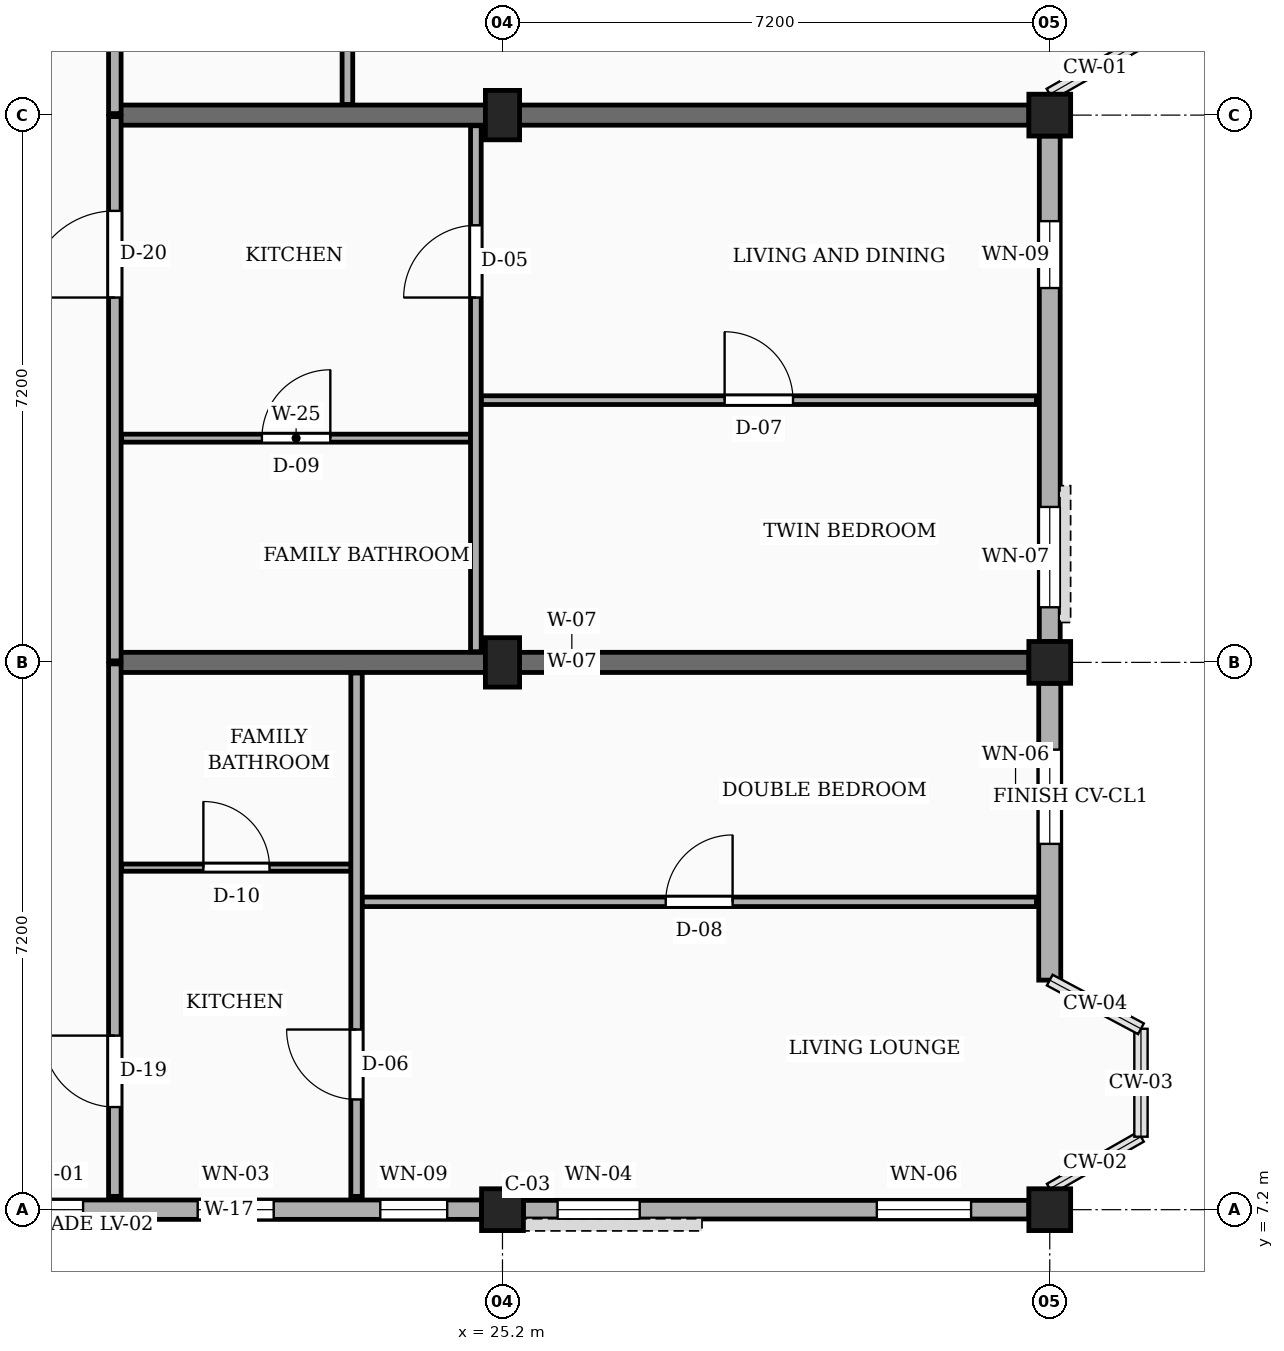
"""IFC4 building model, lengths in metres.
Left out: names, types, materials, properties, quantities, classifications, styles, units other than length and angle.
Written with IfcOpenShell. Run it as: python <this file> out.ifc"""

import sys

from ifc_helpers import new_model, si_unit, direction, frame, frame_2d, origin, origin_2d, place, context, subcontext, project, spatial, rectangle, extrude, element, fill, save


model = new_model("IFC4")
c1 = context("Model", 3, precision=1e-05, world=origin(), true_north=direction((0.0, 1.0)))
c2 = subcontext(c1, "Body", "Model", "MODEL_VIEW")
j1 = project(units=[si_unit("LENGTHUNIT", "METRE"), si_unit("PLANEANGLEUNIT", "RADIAN")], contexts=[c1])
p1 = place(None, origin())
s1 = spatial("IfcSite", under=j1, at=p1, CompositionType="ELEMENT")
p2 = place(p1, origin())
s2 = spatial("IfcBuilding", under=s1, at=p2, CompositionType="ELEMENT")
p3 = place(p2, frame((0.0, 0.0, 10.8)))
s3 = spatial("IfcBuildingStorey", under=s2, at=p3, CompositionType="ELEMENT", Elevation=10.8)
p4 = place(p3, frame((25.2, 7.2, 0.0), z_axis=(0.0, 0.0, 1.0), x_axis=(1.0, 0.0, 0.0)))
e1 = element("IfcColumn", 1, at=p4, inside=s3, PredefinedType="COLUMN", context=c2, shape_type="SweptSolid", body=[
    extrude(rectangle(XDim=0.55, YDim=0.55, at=origin_2d()), origin(), (0.0, 0.0, 1.0), 3.15),
])
for number, where, z_axis, x_axis in (
    (2, (25.2, 14.4, 0.0), (0.0, 0.0, 1.0), (1.0, 0.0, 0.0)),
    (3, (25.2, 21.6, 0.0), (0.0, 0.0, 1.0), (1.0, 0.0, 0.0)),
):
    element("IfcColumn", number, at=place(p3, frame(where, z_axis=z_axis, x_axis=x_axis)), inside=s3, PredefinedType="COLUMN", context=c2, shape_type="SweptSolid", body=[
        extrude(rectangle(XDim=0.45, YDim=0.65, at=origin_2d()), origin(), (0.0, 0.0, 1.0), 3.15),
    ])
for number, where, z_axis, x_axis in (
    (4, (32.4, 7.2, 0.0), (0.0, 0.0, 1.0), (1.0, 0.0, 0.0)),
    (5, (32.4, 14.4, 0.0), (0.0, 0.0, 1.0), (1.0, 0.0, 0.0)),
    (6, (32.4, 21.6, 0.0), (0.0, 0.0, 1.0), (1.0, 0.0, 0.0)),
):
    element("IfcColumn", number, at=place(p3, frame(where, z_axis=z_axis, x_axis=x_axis)), inside=s3, PredefinedType="COLUMN", context=c2, shape_type="SweptSolid", body=[
        extrude(rectangle(XDim=0.55, YDim=0.55, at=origin_2d()), origin(), (0.0, 0.0, 1.0), 3.15),
    ])
for number, where, z_axis, x_axis in (
    (7, (20.1, 14.4, 0.0), (0.0, 0.0, 1.0), (1.0, 0.0, 0.0)),
    (8, (20.1, 21.6, 0.0), (0.0, 0.0, 1.0), (1.0, 0.0, 0.0)),
):
    element("IfcWall", number, at=place(p3, frame(where, z_axis=z_axis, x_axis=x_axis)), inside=s3, PredefinedType="SOLIDWALL", context=c2, shape_type="SweptSolid", body=[
        extrude(rectangle(XDim=12.025, YDim=0.265, at=frame_2d((6.012, 0.0))), origin(), (0.0, 0.0, 1.0), 2.17),
    ])
p5 = place(p3, frame((18.275, 7.2, 0.0), z_axis=(0.0, 0.0, 1.0), x_axis=(1.0, 0.0, 0.0)))
e9 = element("IfcWall", 9, at=p5, inside=s3, PredefinedType="SOLIDWALL", context=c2, shape_type="SweptSolid", body=[
    extrude(rectangle(XDim=6.65, YDim=0.255, at=frame_2d((3.325, 0.0))), origin(), (0.0, 0.0, 1.0), 2.44),
])
p6 = place(p5, frame((0.558, 0.0, 0.78)))
e10 = element("IfcOpeningElement", 10, at=p6, cuts=e9, PredefinedType="OPENING", context=c2, shape_type="SweptSolid", body=[
    extrude(rectangle(XDim=0.85, YDim=1.15, at=frame_2d((0.425, 0.575))), frame((0.0, 0.137, 0.0), z_axis=(0.0, -1.0, 0.0), x_axis=(1.0, 0.0, 0.0)), (0.0, 0.0, 1.0), 0.275),
])
p7 = place(p5, frame((2.915, 0.0, 0.78)))
e11 = element("IfcOpeningElement", 11, at=p7, cuts=e9, PredefinedType="OPENING", context=c2, shape_type="SweptSolid", body=[
    extrude(rectangle(XDim=1.0, YDim=1.15, at=frame_2d((0.5, 0.575))), frame((0.0, 0.137, 0.0), z_axis=(0.0, -1.0, 0.0), x_axis=(1.0, 0.0, 0.0)), (0.0, 0.0, 1.0), 0.275),
])
p8 = place(p5, frame((5.317, 0.0, 0.78)))
e12 = element("IfcOpeningElement", 12, at=p8, cuts=e9, PredefinedType="OPENING", context=c2, shape_type="SweptSolid", body=[
    extrude(rectangle(XDim=0.88, YDim=1.26, at=frame_2d((0.44, 0.63))), frame((0.0, 0.137, 0.0), z_axis=(0.0, -1.0, 0.0), x_axis=(1.0, 0.0, 0.0)), (0.0, 0.0, 1.0), 0.275),
])
p9 = place(p3, frame((25.475, 7.2, 0.0), z_axis=(0.0, 0.0, 1.0), x_axis=(1.0, 0.0, 0.0)))
e13 = element("IfcWall", 13, at=p9, inside=s3, PredefinedType="SOLIDWALL", context=c2, shape_type="SweptSolid", body=[
    extrude(rectangle(XDim=6.65, YDim=0.245, at=frame_2d((3.325, 0.0))), origin(), (0.0, 0.0, 1.0), 2.44),
])
p10 = place(p9, frame((0.45, 0.0, 0.78)))
e14 = element("IfcOpeningElement", 14, at=p10, cuts=e13, PredefinedType="OPENING", context=c2, shape_type="SweptSolid", body=[
    extrude(rectangle(XDim=1.08, YDim=1.15, at=frame_2d((0.54, 0.575))), frame((0.0, 0.133, 0.0), z_axis=(0.0, -1.0, 0.0), x_axis=(1.0, 0.0, 0.0)), (0.0, 0.0, 1.0), 0.265),
])
p11 = place(p9, frame((4.65, 0.0, 0.78)))
e15 = element("IfcOpeningElement", 15, at=p11, cuts=e13, PredefinedType="OPENING", context=c2, shape_type="SweptSolid", body=[
    extrude(rectangle(XDim=1.24, YDim=1.15, at=frame_2d((0.62, 0.575))), frame((0.0, 0.133, 0.0), z_axis=(0.0, -1.0, 0.0), x_axis=(1.0, 0.0, 0.0)), (0.0, 0.0, 1.0), 0.265),
])
p12 = place(p3, frame((32.4, 10.22, 0.0), z_axis=(0.0, 0.0, 1.0), x_axis=(0.0, 1.0, 0.0)))
e16 = element("IfcWall", 16, at=p12, inside=s3, PredefinedType="SOLIDWALL", context=c2, shape_type="SweptSolid", body=[
    extrude(rectangle(XDim=3.905, YDim=0.29, at=frame_2d((1.953, 0.0))), origin(), (0.0, 0.0, 1.0), 2.44),
])
p13 = place(p12, frame((1.792, 0.0, 0.78)))
e17 = element("IfcOpeningElement", 17, at=p13, cuts=e16, PredefinedType="OPENING", context=c2, shape_type="SweptSolid", body=[
    extrude(rectangle(XDim=1.24, YDim=1.15, at=frame_2d((0.62, 0.575))), frame((0.0, 0.155, 0.0), z_axis=(0.0, -1.0, 0.0), x_axis=(1.0, 0.0, 0.0)), (0.0, 0.0, 1.0), 0.31),
])
p14 = place(p3, frame((32.4, 14.675, 0.0), z_axis=(0.0, 0.0, 1.0), x_axis=(0.0, 1.0, 0.0)))
e18 = element("IfcWall", 18, at=p14, inside=s3, PredefinedType="SOLIDWALL", context=c2, shape_type="SweptSolid", body=[
    extrude(rectangle(XDim=6.65, YDim=0.275, at=frame_2d((3.325, 0.0))), origin(), (0.0, 0.0, 1.0), 2.44),
])
p15 = place(p14, frame((0.45, 0.0, 0.78)))
e19 = element("IfcOpeningElement", 19, at=p15, cuts=e18, PredefinedType="OPENING", context=c2, shape_type="SweptSolid", body=[
    extrude(rectangle(XDim=1.32, YDim=1.15, at=frame_2d((0.66, 0.575))), frame((0.0, 0.147, 0.0), z_axis=(0.0, -1.0, 0.0), x_axis=(1.0, 0.0, 0.0)), (0.0, 0.0, 1.0), 0.295),
])
p16 = place(p14, frame((4.65, 0.0, 0.78)))
e20 = element("IfcOpeningElement", 20, at=p16, cuts=e18, PredefinedType="OPENING", context=c2, shape_type="SweptSolid", body=[
    extrude(rectangle(XDim=0.88, YDim=1.26, at=frame_2d((0.44, 0.63))), frame((0.0, 0.147, 0.0), z_axis=(0.0, -1.0, 0.0), x_axis=(1.0, 0.0, 0.0)), (0.0, 0.0, 1.0), 0.295),
])
p17 = place(p3, frame((20.1, 7.375, 0.0), z_axis=(0.0, 0.0, 1.0), x_axis=(0.0, 1.0, 0.0)))
e21 = element("IfcWall", 21, at=p17, inside=s3, PredefinedType="PARTITIONING", context=c2, shape_type="SweptSolid", body=[
    extrude(rectangle(XDim=7.005, YDim=0.165, at=frame_2d((3.502, 0.0))), origin(), (0.0, 0.0, 1.0), 2.305),
])
p18 = place(p17, frame((1.175, 0.0, 0.0)))
e22 = element("IfcOpeningElement", 22, at=p18, cuts=e21, PredefinedType="OPENING", context=c2, shape_type="SweptSolid", body=[
    extrude(rectangle(XDim=0.94, YDim=2.12, at=frame_2d((0.47, 1.06))), frame((0.0, 0.093, 0.0), z_axis=(0.0, -1.0, 0.0), x_axis=(1.0, 0.0, 0.0)), (0.0, 0.0, 1.0), 0.185),
])
p19 = place(p3, frame((20.1, 14.42, 0.0), z_axis=(0.0, 0.0, 1.0), x_axis=(0.0, 1.0, 0.0)))
e23 = element("IfcWall", 23, at=p19, inside=s3, PredefinedType="PARTITIONING", context=c2, shape_type="SweptSolid", body=[
    extrude(rectangle(XDim=7.16, YDim=0.165, at=frame_2d((3.58, 0.0))), origin(), (0.0, 0.0, 1.0), 2.305),
])
p20 = place(p19, frame((4.78, 0.0, 0.0)))
e24 = element("IfcOpeningElement", 24, at=p20, cuts=e23, PredefinedType="OPENING", context=c2, shape_type="SweptSolid", body=[
    extrude(rectangle(XDim=1.14, YDim=2.18, at=frame_2d((0.57, 1.09))), frame((0.0, 0.093, 0.0), z_axis=(0.0, -1.0, 0.0), x_axis=(1.0, 0.0, 0.0)), (0.0, 0.0, 1.0), 0.185),
])
p21 = place(p3, frame((20.1, 21.62, 0.0), z_axis=(0.0, 0.0, 1.0), x_axis=(0.0, 1.0, 0.0)))
e25 = element("IfcWall", 25, at=p21, inside=s3, PredefinedType="PARTITIONING", context=c2, shape_type="SweptSolid", body=[
    extrude(rectangle(XDim=7.16, YDim=0.165, at=frame_2d((3.58, 0.0))), origin(), (0.0, 0.0, 1.0), 2.305),
])
p22 = place(p21, frame((1.33, 0.0, 0.0)))
e26 = element("IfcOpeningElement", 26, at=p22, cuts=e25, PredefinedType="OPENING", context=c2, shape_type="SweptSolid", body=[
    extrude(rectangle(XDim=1.0, YDim=2.15, at=frame_2d((0.5, 1.075))), frame((0.0, 0.093, 0.0), z_axis=(0.0, -1.0, 0.0), x_axis=(1.0, 0.0, 0.0)), (0.0, 0.0, 1.0), 0.185),
])
p23 = place(p3, frame((23.35, 11.25, 0.0), z_axis=(0.0, 0.0, 1.0), x_axis=(1.0, 0.0, 0.0)))
e27 = element("IfcWall", 27, at=p23, inside=s3, PredefinedType="PARTITIONING", context=c2, shape_type="SweptSolid", body=[
    extrude(rectangle(XDim=8.875, YDim=0.125, at=frame_2d((4.438, 0.0))), origin(), (0.0, 0.0, 1.0), 2.305),
])
p24 = place(p23, frame((3.998, 0.0, 0.0)))
e28 = element("IfcOpeningElement", 28, at=p24, cuts=e27, PredefinedType="OPENING", context=c2, shape_type="SweptSolid", body=[
    extrude(rectangle(XDim=0.88, YDim=2.08, at=frame_2d((0.44, 1.04))), frame((0.0, 0.073, 0.0), z_axis=(0.0, -1.0, 0.0), x_axis=(1.0, 0.0, 0.0)), (0.0, 0.0, 1.0), 0.145),
])
p25 = place(p3, frame((20.19, 11.7, 0.0), z_axis=(0.0, 0.0, 1.0), x_axis=(1.0, 0.0, 0.0)))
e29 = element("IfcWall", 29, at=p25, inside=s3, PredefinedType="PARTITIONING", context=c2, shape_type="SweptSolid", body=[
    extrude(rectangle(XDim=3.02, YDim=0.095, at=frame_2d((1.51, 0.0))), origin(), (0.0, 0.0, 1.0), 2.305),
])
p26 = place(p25, frame((1.075, 0.0, 0.0)))
e30 = element("IfcOpeningElement", 30, at=p26, cuts=e29, PredefinedType="OPENING", context=c2, shape_type="SweptSolid", body=[
    extrude(rectangle(XDim=0.87, YDim=2.05, at=frame_2d((0.435, 1.025))), frame((0.0, 0.058, 0.0), z_axis=(0.0, -1.0, 0.0), x_axis=(1.0, 0.0, 0.0)), (0.0, 0.0, 1.0), 0.115),
])
p27 = place(p3, frame((23.28, 7.375, 0.0), z_axis=(0.0, 0.0, 1.0), x_axis=(0.0, 1.0, 0.0)))
e31 = element("IfcWall", 31, at=p27, inside=s3, PredefinedType="PARTITIONING", context=c2, shape_type="SweptSolid", body=[
    extrude(rectangle(XDim=6.885, YDim=0.15, at=frame_2d((3.442, 0.0))), origin(), (0.0, 0.0, 1.0), 2.305),
])
p28 = place(p27, frame((1.275, 0.0, 0.0)))
e32 = element("IfcOpeningElement", 32, at=p28, cuts=e31, PredefinedType="OPENING", context=c2, shape_type="SweptSolid", body=[
    extrude(rectangle(XDim=0.92, YDim=2.1, at=frame_2d((0.46, 1.05))), frame((0.0, 0.085, 0.0), z_axis=(0.0, -1.0, 0.0), x_axis=(1.0, 0.0, 0.0)), (0.0, 0.0, 1.0), 0.17),
])
p29 = place(p3, frame((24.92, 17.85, 0.0), z_axis=(0.0, 0.0, 1.0), x_axis=(1.0, 0.0, 0.0)))
e33 = element("IfcWall", 33, at=p29, inside=s3, PredefinedType="PARTITIONING", context=c2, shape_type="SweptSolid", body=[
    extrude(rectangle(XDim=7.305, YDim=0.115, at=frame_2d((3.653, 0.0))), origin(), (0.0, 0.0, 1.0), 2.305),
])
p30 = place(p29, frame((3.202, 0.0, 0.0)))
e34 = element("IfcOpeningElement", 34, at=p30, cuts=e33, PredefinedType="OPENING", context=c2, shape_type="SweptSolid", body=[
    extrude(rectangle(XDim=0.9, YDim=2.1, at=frame_2d((0.45, 1.05))), frame((0.0, 0.067, 0.0), z_axis=(0.0, -1.0, 0.0), x_axis=(1.0, 0.0, 0.0)), (0.0, 0.0, 1.0), 0.135),
])
p31 = place(p3, frame((20.19, 17.35, 0.0), z_axis=(0.0, 0.0, 1.0), x_axis=(1.0, 0.0, 0.0)))
e35 = element("IfcWall", 35, at=p31, inside=s3, PredefinedType="PARTITIONING", context=c2, shape_type="SweptSolid", body=[
    extrude(rectangle(XDim=4.59, YDim=0.105, at=frame_2d((2.295, 0.0))), origin(), (0.0, 0.0, 1.0), 2.305),
])
p32 = place(p31, frame((1.845, 0.0, 0.0)))
e36 = element("IfcOpeningElement", 36, at=p32, cuts=e35, PredefinedType="OPENING", context=c2, shape_type="SweptSolid", body=[
    extrude(rectangle(XDim=0.9, YDim=2.05, at=frame_2d((0.45, 1.025))), frame((0.0, 0.062, 0.0), z_axis=(0.0, -1.0, 0.0), x_axis=(1.0, 0.0, 0.0)), (0.0, 0.0, 1.0), 0.125),
])
p33 = place(p3, frame((24.85, 14.54, 0.0), z_axis=(0.0, 0.0, 1.0), x_axis=(0.0, 1.0, 0.0)))
e37 = element("IfcWall", 37, at=p33, inside=s3, PredefinedType="PARTITIONING", context=c2, shape_type="SweptSolid", body=[
    extrude(rectangle(XDim=6.92, YDim=0.14, at=frame_2d((3.46, 0.0))), origin(), (0.0, 0.0, 1.0), 2.305),
])
p34 = place(p33, frame((4.66, 0.0, 0.0)))
e38 = element("IfcOpeningElement", 38, at=p34, cuts=e37, PredefinedType="OPENING", context=c2, shape_type="SweptSolid", body=[
    extrude(rectangle(XDim=0.95, YDim=2.1, at=frame_2d((0.475, 1.05))), frame((0.0, 0.08, 0.0), z_axis=(0.0, -1.0, 0.0), x_axis=(1.0, 0.0, 0.0)), (0.0, 0.0, 1.0), 0.16),
])
p35 = place(p3, frame((23.16, 21.74, 0.0), z_axis=(0.0, 0.0, 1.0), x_axis=(0.0, 1.0, 0.0)))
e39 = element("IfcWall", 39, at=p35, inside=s3, PredefinedType="PARTITIONING", context=c2, shape_type="SweptSolid", body=[
    extrude(rectangle(XDim=6.92, YDim=0.14, at=frame_2d((3.46, 0.0))), origin(), (0.0, 0.0, 1.0), 2.305),
])
p36 = place(p35, frame((1.31, 0.0, 0.0)))
e40 = element("IfcOpeningElement", 40, at=p36, cuts=e39, PredefinedType="OPENING", context=c2, shape_type="SweptSolid", body=[
    extrude(rectangle(XDim=0.92, YDim=2.1, at=frame_2d((0.46, 1.05))), frame((0.0, 0.08, 0.0), z_axis=(0.0, -1.0, 0.0), x_axis=(1.0, 0.0, 0.0)), (0.0, 0.0, 1.0), 0.16),
])
p37 = place(p6, origin())
e41 = element("IfcWindow", 41, at=p37, inside=s3, PartitioningType="SINGLE_PANEL", PredefinedType="WINDOW", context=c2, shape_type="SweptSolid", body=[
    extrude(rectangle(XDim=0.85, YDim=1.15, at=frame_2d((0.425, 0.575))), frame((0.0, 0.03, 0.0), z_axis=(0.0, -1.0, 0.0), x_axis=(1.0, 0.0, 0.0)), (0.0, 0.0, 1.0), 0.06),
])
fill(e10, e41)
p38 = place(p7, origin())
e42 = element("IfcWindow", 42, at=p38, inside=s3, PartitioningType="SINGLE_PANEL", PredefinedType="WINDOW", context=c2, shape_type="SweptSolid", body=[
    extrude(rectangle(XDim=1.0, YDim=1.15, at=frame_2d((0.5, 0.575))), frame((0.0, 0.03, 0.0), z_axis=(0.0, -1.0, 0.0), x_axis=(1.0, 0.0, 0.0)), (0.0, 0.0, 1.0), 0.06),
])
fill(e11, e42)
p39 = place(p8, origin())
e43 = element("IfcWindow", 43, at=p39, inside=s3, PartitioningType="SINGLE_PANEL", PredefinedType="WINDOW", context=c2, shape_type="SweptSolid", body=[
    extrude(rectangle(XDim=0.88, YDim=1.26, at=frame_2d((0.44, 0.63))), frame((0.0, 0.03, 0.0), z_axis=(0.0, -1.0, 0.0), x_axis=(1.0, 0.0, 0.0)), (0.0, 0.0, 1.0), 0.06),
])
fill(e12, e43)
p40 = place(p10, origin())
e44 = element("IfcWindow", 44, at=p40, inside=s3, PartitioningType="SINGLE_PANEL", PredefinedType="WINDOW", context=c2, shape_type="SweptSolid", body=[
    extrude(rectangle(XDim=1.08, YDim=1.15, at=frame_2d((0.54, 0.575))), frame((0.0, 0.03, 0.0), z_axis=(0.0, -1.0, 0.0), x_axis=(1.0, 0.0, 0.0)), (0.0, 0.0, 1.0), 0.06),
])
fill(e14, e44)
p41 = place(p11, origin())
e45 = element("IfcWindow", 45, at=p41, inside=s3, PartitioningType="SINGLE_PANEL", PredefinedType="WINDOW", context=c2, shape_type="SweptSolid", body=[
    extrude(rectangle(XDim=1.24, YDim=1.15, at=frame_2d((0.62, 0.575))), frame((0.0, 0.03, 0.0), z_axis=(0.0, -1.0, 0.0), x_axis=(1.0, 0.0, 0.0)), (0.0, 0.0, 1.0), 0.06),
])
fill(e15, e45)
p42 = place(p13, origin())
e46 = element("IfcWindow", 46, at=p42, inside=s3, PartitioningType="SINGLE_PANEL", PredefinedType="WINDOW", context=c2, shape_type="SweptSolid", body=[
    extrude(rectangle(XDim=1.24, YDim=1.15, at=frame_2d((0.62, 0.575))), frame((0.0, 0.03, 0.0), z_axis=(0.0, -1.0, 0.0), x_axis=(1.0, 0.0, 0.0)), (0.0, 0.0, 1.0), 0.06),
])
fill(e17, e46)
p43 = place(p15, origin())
e47 = element("IfcWindow", 47, at=p43, inside=s3, PartitioningType="SINGLE_PANEL", PredefinedType="WINDOW", context=c2, shape_type="SweptSolid", body=[
    extrude(rectangle(XDim=1.32, YDim=1.15, at=frame_2d((0.66, 0.575))), frame((0.0, 0.03, 0.0), z_axis=(0.0, -1.0, 0.0), x_axis=(1.0, 0.0, 0.0)), (0.0, 0.0, 1.0), 0.06),
])
fill(e19, e47)
p44 = place(p16, origin())
e48 = element("IfcWindow", 48, at=p44, inside=s3, PartitioningType="SINGLE_PANEL", PredefinedType="WINDOW", context=c2, shape_type="SweptSolid", body=[
    extrude(rectangle(XDim=0.88, YDim=1.26, at=frame_2d((0.44, 0.63))), frame((0.0, 0.03, 0.0), z_axis=(0.0, -1.0, 0.0), x_axis=(1.0, 0.0, 0.0)), (0.0, 0.0, 1.0), 0.06),
])
fill(e20, e48)
p45 = place(p18, origin())
e49 = element("IfcDoor", 49, at=p45, inside=s3, OperationType="SINGLE_SWING_RIGHT", PredefinedType="DOOR", context=c2, shape_type="SweptSolid", body=[
    extrude(rectangle(XDim=0.94, YDim=2.12, at=frame_2d((0.47, 1.06))), frame((0.0, 0.025, 0.0), z_axis=(0.0, -1.0, 0.0), x_axis=(1.0, 0.0, 0.0)), (0.0, 0.0, 1.0), 0.05),
])
fill(e22, e49)
p46 = place(p20, origin())
e50 = element("IfcDoor", 50, at=p46, inside=s3, OperationType="SINGLE_SWING_LEFT", PredefinedType="DOOR", context=c2, shape_type="SweptSolid", body=[
    extrude(rectangle(XDim=1.14, YDim=2.18, at=frame_2d((0.57, 1.09))), frame((0.0, 0.025, 0.0), z_axis=(0.0, -1.0, 0.0), x_axis=(1.0, 0.0, 0.0)), (0.0, 0.0, 1.0), 0.05),
])
fill(e24, e50)
p47 = place(p24, origin())
e51 = element("IfcDoor", 51, at=p47, inside=s3, OperationType="SINGLE_SWING_RIGHT", PredefinedType="DOOR", context=c2, shape_type="SweptSolid", body=[
    extrude(rectangle(XDim=0.88, YDim=2.08, at=frame_2d((0.44, 1.04))), frame((0.0, 0.025, 0.0), z_axis=(0.0, -1.0, 0.0), x_axis=(1.0, 0.0, 0.0)), (0.0, 0.0, 1.0), 0.05),
])
fill(e28, e51)
p48 = place(p26, origin())
e52 = element("IfcDoor", 52, at=p48, inside=s3, OperationType="SINGLE_SWING_LEFT", PredefinedType="DOOR", context=c2, shape_type="SweptSolid", body=[
    extrude(rectangle(XDim=0.87, YDim=2.05, at=frame_2d((0.435, 1.025))), frame((0.0, 0.025, 0.0), z_axis=(0.0, -1.0, 0.0), x_axis=(1.0, 0.0, 0.0)), (0.0, 0.0, 1.0), 0.05),
])
fill(e30, e52)
p49 = place(p28, origin())
e53 = element("IfcDoor", 53, at=p49, inside=s3, OperationType="SINGLE_SWING_RIGHT", PredefinedType="DOOR", context=c2, shape_type="SweptSolid", body=[
    extrude(rectangle(XDim=0.92, YDim=2.1, at=frame_2d((0.46, 1.05))), frame((0.0, 0.025, 0.0), z_axis=(0.0, -1.0, 0.0), x_axis=(1.0, 0.0, 0.0)), (0.0, 0.0, 1.0), 0.05),
])
fill(e32, e53)
p50 = place(p30, origin())
e54 = element("IfcDoor", 54, at=p50, inside=s3, OperationType="SINGLE_SWING_LEFT", PredefinedType="DOOR", context=c2, shape_type="SweptSolid", body=[
    extrude(rectangle(XDim=0.9, YDim=2.1, at=frame_2d((0.45, 1.05))), frame((0.0, 0.025, 0.0), z_axis=(0.0, -1.0, 0.0), x_axis=(1.0, 0.0, 0.0)), (0.0, 0.0, 1.0), 0.05),
])
fill(e34, e54)
p51 = place(p32, origin())
e55 = element("IfcDoor", 55, at=p51, inside=s3, OperationType="SINGLE_SWING_RIGHT", PredefinedType="DOOR", context=c2, shape_type="SweptSolid", body=[
    extrude(rectangle(XDim=0.9, YDim=2.05, at=frame_2d((0.45, 1.025))), frame((0.0, 0.025, 0.0), z_axis=(0.0, -1.0, 0.0), x_axis=(1.0, 0.0, 0.0)), (0.0, 0.0, 1.0), 0.05),
])
fill(e36, e55)
p52 = place(p34, origin())
e56 = element("IfcDoor", 56, at=p52, inside=s3, OperationType="SINGLE_SWING_LEFT", PredefinedType="DOOR", context=c2, shape_type="SweptSolid", body=[
    extrude(rectangle(XDim=0.95, YDim=2.1, at=frame_2d((0.475, 1.05))), frame((0.0, 0.025, 0.0), z_axis=(0.0, -1.0, 0.0), x_axis=(1.0, 0.0, 0.0)), (0.0, 0.0, 1.0), 0.05),
])
fill(e38, e56)
save(model, sys.argv[1])
